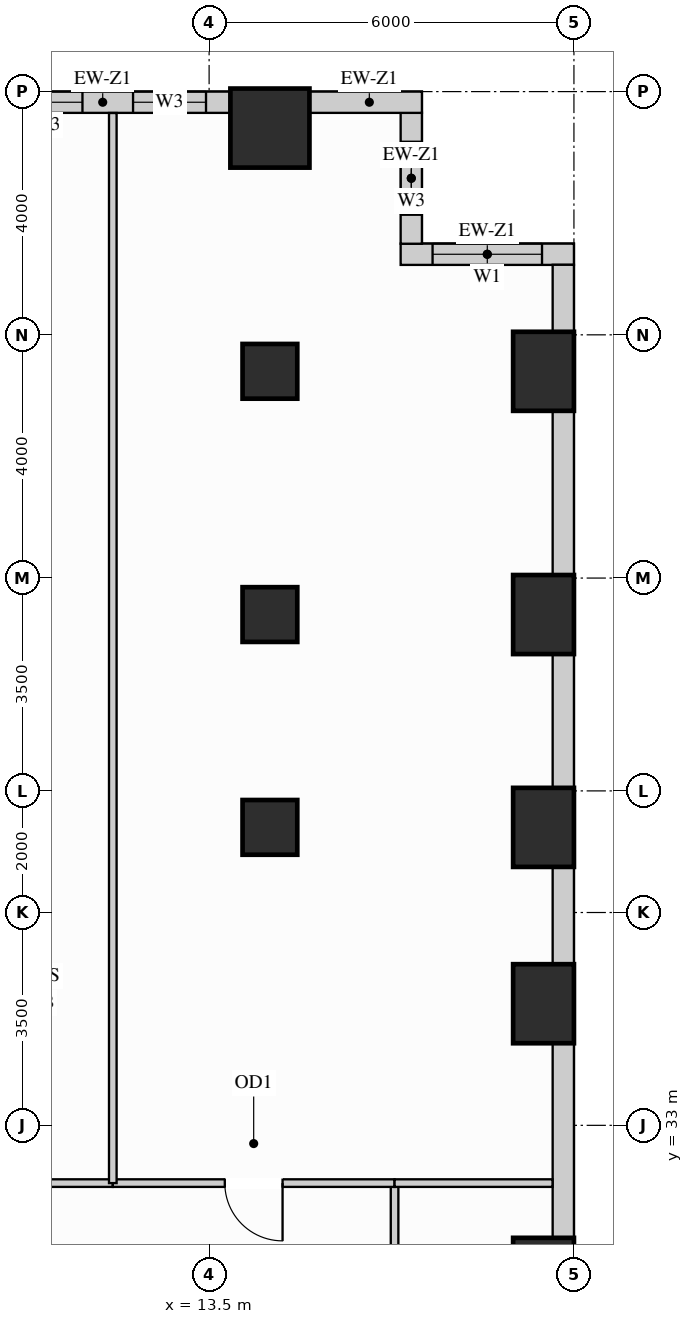
"""IFC4 building model, lengths in metres.
Left out: names, types, materials, properties, quantities, classifications, styles, units other than length and angle.
Written with IfcOpenShell. Run it as: python <this file> out.ifc"""

import sys

from ifc_helpers import new_model, si_unit, direction, frame, frame_2d, origin, origin_2d, place, context, subcontext, project, spatial, rectangle, extrude, source, transform, mapped, element, fill, save


model = new_model("IFC4")
c1 = context("Model", 3, precision=1e-05, world=origin(), true_north=direction((0.0, 1.0)))
c2 = subcontext(c1, "Body", "Model", "MODEL_VIEW")
j1 = project(units=[si_unit("LENGTHUNIT", "METRE"), si_unit("PLANEANGLEUNIT", "RADIAN")], contexts=[c1])
p1 = place(None, origin())
s1 = spatial("IfcSite", under=j1, at=p1, CompositionType="ELEMENT")
p2 = place(p1, origin())
s2 = spatial("IfcBuilding", under=s1, at=p2, CompositionType="ELEMENT")
p3 = place(p2, frame((0.0, 0.0, 58.5)))
s3 = spatial("IfcBuildingStorey", under=s2, at=p3, CompositionType="ELEMENT", Elevation=58.5)
m1 = source(origin(), c2, "Body", "SweptSolid", [
    extrude(rectangle(XDim=0.9, YDim=0.9, at=origin_2d()), origin(), (0.0, 0.0, 1.0), 3.38),
])
for number, where, z_axis, x_axis in (
    (1, (14.5, 37.9, 0.0), (0.0, 0.0, 1.0), (1.0, 0.0, 0.0)),
    (2, (14.5, 41.4, 0.0), (0.0, 0.0, 1.0), (1.0, 0.0, 0.0)),
    (3, (14.5, 45.4, 0.0), (0.0, 0.0, 1.0), (1.0, 0.0, 0.0)),
):
    element("IfcColumn", number, at=place(p3, frame(where, z_axis=z_axis, x_axis=x_axis)), inside=s3, PredefinedType="COLUMN", context=c2, shape_type="MappedRepresentation", body=[
        mapped(m1, transform((0.0, 0.0, 0.0), x_axis=(1.0, 0.0, 0.0), y_axis=(0.0, 1.0, 0.0), z_axis=(0.0, 0.0, 1.0))),
    ])
m2 = source(origin(), c2, "Body", "SweptSolid", [
    extrude(rectangle(XDim=1.0, YDim=1.3, at=origin_2d()), origin(), (0.0, 0.0, 1.0), 3.38),
])
for number, where, z_axis, x_axis in (
    (4, (19.0, 30.5, 0.0), (0.0, 0.0, 1.0), (1.0, 0.0, 0.0)),
    (5, (19.0, 35.0, 0.0), (0.0, 0.0, 1.0), (1.0, 0.0, 0.0)),
    (6, (19.0, 37.9, 0.0), (0.0, 0.0, 1.0), (1.0, 0.0, 0.0)),
    (7, (19.0, 41.4, 0.0), (0.0, 0.0, 1.0), (1.0, 0.0, 0.0)),
    (8, (19.0, 45.4, 0.0), (0.0, 0.0, 1.0), (1.0, 0.0, 0.0)),
):
    element("IfcColumn", number, at=place(p3, frame(where, z_axis=z_axis, x_axis=x_axis)), inside=s3, PredefinedType="COLUMN", context=c2, shape_type="MappedRepresentation", body=[
        mapped(m2, transform((0.0, 0.0, 0.0), x_axis=(1.0, 0.0, 0.0), y_axis=(0.0, 1.0, 0.0), z_axis=(0.0, 0.0, 1.0))),
    ])
m3 = source(origin(), c2, "Body", "SweptSolid", [
    extrude(rectangle(XDim=1.3, YDim=1.3, at=origin_2d()), origin(), (0.0, 0.0, 1.0), 3.38),
])
p4 = place(p3, frame((14.5, 49.4, 0.0), z_axis=(0.0, 0.0, 1.0), x_axis=(1.0, 0.0, 0.0)))
e9 = element("IfcColumn", 9, at=p4, inside=s3, PredefinedType="COLUMN", context=c2, shape_type="MappedRepresentation", body=[
    mapped(m3, transform((0.0, 0.0, 0.0), x_axis=(1.0, 0.0, 0.0), y_axis=(0.0, 1.0, 0.0), z_axis=(0.0, 0.0, 1.0))),
])
p5 = place(p3, frame((19.5, 47.325, 0.0), z_axis=(0.0, 0.0, 1.0), x_axis=(-1.0, 0.0, 0.0)))
e10 = element("IfcWall", 10, at=p5, inside=s3, PredefinedType="SOLIDWALL", context=c2, shape_type="SweptSolid", body=[
    extrude(rectangle(XDim=2.85, YDim=0.35, at=frame_2d((1.425, 0.0))), origin(), (0.0, 0.0, 1.0), 3.365),
])
p6 = place(p5, frame((0.525, 0.0, 0.78)))
e11 = element("IfcOpeningElement", 11, at=p6, cuts=e10, PredefinedType="OPENING", context=c2, shape_type="SweptSolid", body=[
    extrude(rectangle(XDim=1.8, YDim=2.1, at=frame_2d((0.9, 1.05))), frame((0.0, 0.185, 0.0), z_axis=(0.0, -1.0, 0.0), x_axis=(1.0, 0.0, 0.0)), (0.0, 0.0, 1.0), 0.37),
])
p7 = place(p3, frame((16.825, 47.498, 0.0), z_axis=(0.0, 0.0, 1.0), x_axis=(0.0, 1.0, 0.0)))
e12 = element("IfcWall", 12, at=p7, inside=s3, PredefinedType="SOLIDWALL", context=c2, shape_type="SweptSolid", body=[
    extrude(rectangle(XDim=2.154, YDim=0.35, at=frame_2d((1.077, 0.0))), origin(), (0.0, 0.0, 1.0), 3.365),
])
p8 = place(p7, frame((0.477, 0.0, 0.78)))
e13 = element("IfcOpeningElement", 13, at=p8, cuts=e12, PredefinedType="OPENING", context=c2, shape_type="SweptSolid", body=[
    extrude(rectangle(XDim=1.2, YDim=2.1, at=frame_2d((0.6, 1.05))), frame((0.0, 0.185, 0.0), z_axis=(0.0, -1.0, 0.0), x_axis=(1.0, 0.0, 0.0)), (0.0, 0.0, 1.0), 0.37),
])
m4 = source(origin(), c2, "Body", "SweptSolid", [
    extrude(rectangle(XDim=1.852, YDim=0.35, at=frame_2d((0.926, 0.0))), origin(), (0.0, 0.0, 1.0), 3.365),
])
p9 = place(p3, frame((17.0, 49.825, 0.0), z_axis=(0.0, 0.0, 1.0), x_axis=(-1.0, 0.0, 0.0)))
e14 = element("IfcWall", 14, at=p9, inside=s3, PredefinedType="SOLIDWALL", context=c2, shape_type="MappedRepresentation", body=[
    mapped(m4, transform((0.0, 0.0, 0.0), x_axis=(1.0, 0.0, 0.0), y_axis=(0.0, 1.0, 0.0), z_axis=(0.0, 0.0, 1.0))),
])
p10 = place(p3, frame((13.852, 49.825, 0.0), z_axis=(0.0, 0.0, 1.0), x_axis=(-1.0, 0.0, 0.0)))
e15 = element("IfcWall", 15, at=p10, inside=s3, PredefinedType="SOLIDWALL", context=c2, shape_type="SweptSolid", body=[
    extrude(rectangle(XDim=4.204, YDim=0.35, at=frame_2d((2.102, 0.0))), origin(), (0.0, 0.0, 1.0), 2.51),
])
p11 = place(p10, frame((0.403, 0.0, 0.78)))
e16 = element("IfcOpeningElement", 16, at=p11, cuts=e15, PredefinedType="OPENING", context=c2, shape_type="SweptSolid", body=[
    extrude(rectangle(XDim=1.2, YDim=1.55, at=frame_2d((0.6, 0.775))), frame((0.0, 0.185, 0.0), z_axis=(0.0, -1.0, 0.0), x_axis=(1.0, 0.0, 0.0)), (0.0, 0.0, 1.0), 0.37),
])
p12 = place(p10, frame((2.435, 0.0, 0.78)))
e17 = element("IfcOpeningElement", 17, at=p12, cuts=e15, PredefinedType="OPENING", context=c2, shape_type="SweptSolid", body=[
    extrude(rectangle(XDim=1.2, YDim=1.55, at=frame_2d((0.6, 0.775))), frame((0.0, 0.185, 0.0), z_axis=(0.0, -1.0, 0.0), x_axis=(1.0, 0.0, 0.0)), (0.0, 0.0, 1.0), 0.37),
])
m5 = source(origin(), c2, "Body", "SweptSolid", [
    extrude(rectangle(XDim=3.204, YDim=0.35, at=frame_2d((1.602, 0.0))), origin(), (0.0, 0.0, 1.0), 2.51),
])
p13 = place(p3, frame((19.325, 31.148, 0.0), z_axis=(0.0, 0.0, 1.0), x_axis=(0.0, 1.0, 0.0)))
e18 = element("IfcWall", 18, at=p13, inside=s3, PredefinedType="SOLIDWALL", context=c2, shape_type="MappedRepresentation", body=[
    mapped(m5, transform((0.0, 0.0, 0.0), x_axis=(1.0, 0.0, 0.0), y_axis=(0.0, 1.0, 0.0), z_axis=(0.0, 0.0, 1.0))),
])
m6 = source(origin(), c2, "Body", "SweptSolid", [
    extrude(rectangle(XDim=1.604, YDim=0.35, at=frame_2d((0.802, 0.0))), origin(), (0.0, 0.0, 1.0), 2.51),
])
p14 = place(p3, frame((19.325, 35.648, 0.0), z_axis=(0.0, 0.0, 1.0), x_axis=(0.0, 1.0, 0.0)))
e19 = element("IfcWall", 19, at=p14, inside=s3, PredefinedType="SOLIDWALL", context=c2, shape_type="MappedRepresentation", body=[
    mapped(m6, transform((0.0, 0.0, 0.0), x_axis=(1.0, 0.0, 0.0), y_axis=(0.0, 1.0, 0.0), z_axis=(0.0, 0.0, 1.0))),
])
m7 = source(origin(), c2, "Body", "SweptSolid", [
    extrude(rectangle(XDim=2.204, YDim=0.35, at=frame_2d((1.102, 0.0))), origin(), (0.0, 0.0, 1.0), 2.51),
])
p15 = place(p3, frame((19.325, 38.548, 0.0), z_axis=(0.0, 0.0, 1.0), x_axis=(0.0, 1.0, 0.0)))
e20 = element("IfcWall", 20, at=p15, inside=s3, PredefinedType="SOLIDWALL", context=c2, shape_type="MappedRepresentation", body=[
    mapped(m7, transform((0.0, 0.0, 0.0), x_axis=(1.0, 0.0, 0.0), y_axis=(0.0, 1.0, 0.0), z_axis=(0.0, 0.0, 1.0))),
])
m8 = source(origin(), c2, "Body", "SweptSolid", [
    extrude(rectangle(XDim=2.704, YDim=0.35, at=frame_2d((1.352, 0.0))), origin(), (0.0, 0.0, 1.0), 2.51),
])
p16 = place(p3, frame((19.325, 42.048, 0.0), z_axis=(0.0, 0.0, 1.0), x_axis=(0.0, 1.0, 0.0)))
e21 = element("IfcWall", 21, at=p16, inside=s3, PredefinedType="SOLIDWALL", context=c2, shape_type="MappedRepresentation", body=[
    mapped(m8, transform((0.0, 0.0, 0.0), x_axis=(1.0, 0.0, 0.0), y_axis=(0.0, 1.0, 0.0), z_axis=(0.0, 0.0, 1.0))),
])
m9 = source(origin(), c2, "Body", "SweptSolid", [
    extrude(rectangle(XDim=1.104, YDim=0.35, at=frame_2d((0.552, 0.0))), origin(), (0.0, 0.0, 1.0), 3.365),
])
p17 = place(p3, frame((19.325, 46.048, 0.0), z_axis=(0.0, 0.0, 1.0), x_axis=(0.0, 1.0, 0.0)))
e22 = element("IfcWall", 22, at=p17, inside=s3, PredefinedType="SOLIDWALL", context=c2, shape_type="MappedRepresentation", body=[
    mapped(m9, transform((0.0, 0.0, 0.0), x_axis=(1.0, 0.0, 0.0), y_axis=(0.0, 1.0, 0.0), z_axis=(0.0, 0.0, 1.0))),
])
p18 = place(p3, frame((16.55, 26.05, 0.0), z_axis=(0.0, 0.0, 1.0), x_axis=(0.0, 1.0, 0.0)))
e23 = element("IfcWall", 23, at=p18, inside=s3, PredefinedType="PARTITIONING", context=c2, shape_type="SweptSolid", body=[
    extrude(rectangle(XDim=6.0, YDim=0.125, at=frame_2d((3.0, 0.0))), origin(), (0.0, 0.0, 1.0), 3.365),
])
p19 = place(p18, frame((2.525, 0.0, 0.0)))
e24 = element("IfcOpeningElement", 24, at=p19, cuts=e23, PredefinedType="OPENING", context=c2, shape_type="SweptSolid", body=[
    extrude(rectangle(XDim=0.95, YDim=2.15, at=frame_2d((0.475, 1.075))), frame((0.0, 0.073, 0.0), z_axis=(0.0, -1.0, 0.0), x_axis=(1.0, 0.0, 0.0)), (0.0, 0.0, 1.0), 0.145),
])
p20 = place(p3, frame((7.121, 32.05, 0.0), z_axis=(0.0, 0.0, 1.0), x_axis=(1.0, 0.0, 0.0)))
e25 = element("IfcWall", 25, at=p20, inside=s3, PredefinedType="PARTITIONING", context=c2, shape_type="SweptSolid", body=[
    extrude(rectangle(XDim=4.795, YDim=0.125, at=frame_2d((2.397, 0.0))), origin(), (0.0, 0.0, 1.0), 3.365),
])
p21 = place(p20, frame((1.923, 0.0, 0.0)))
e26 = element("IfcOpeningElement", 26, at=p21, cuts=e25, PredefinedType="OPENING", context=c2, shape_type="SweptSolid", body=[
    extrude(rectangle(XDim=0.95, YDim=2.15, at=frame_2d((0.475, 1.075))), frame((0.0, 0.073, 0.0), z_axis=(0.0, -1.0, 0.0), x_axis=(1.0, 0.0, 0.0)), (0.0, 0.0, 1.0), 0.145),
])
p22 = place(p3, frame((11.916, 32.05, 0.0), z_axis=(0.0, 0.0, 1.0), x_axis=(1.0, 0.0, 0.0)))
e27 = element("IfcWall", 27, at=p22, inside=s3, PredefinedType="PARTITIONING", context=c2, shape_type="SweptSolid", body=[
    extrude(rectangle(XDim=4.634, YDim=0.125, at=frame_2d((2.317, 0.0))), origin(), (0.0, 0.0, 1.0), 3.365),
])
p23 = place(p22, frame((1.842, 0.0, 0.0)))
e28 = element("IfcOpeningElement", 28, at=p23, cuts=e27, PredefinedType="OPENING", context=c2, shape_type="SweptSolid", body=[
    extrude(rectangle(XDim=0.95, YDim=2.15, at=frame_2d((0.475, 1.075))), frame((0.0, 0.073, 0.0), z_axis=(0.0, -1.0, 0.0), x_axis=(1.0, 0.0, 0.0)), (0.0, 0.0, 1.0), 0.145),
])
m10 = source(origin(), c2, "Body", "SweptSolid", [
    extrude(rectangle(XDim=2.598, YDim=0.125, at=frame_2d((1.299, 0.0))), origin(), (0.0, 0.0, 1.0), 3.365),
])
p24 = place(p3, frame((16.55, 32.05, 0.0), z_axis=(0.0, 0.0, 1.0), x_axis=(1.0, 0.0, 0.0)))
e29 = element("IfcWall", 29, at=p24, inside=s3, PredefinedType="PARTITIONING", context=c2, shape_type="MappedRepresentation", body=[
    mapped(m10, transform((0.0, 0.0, 0.0), x_axis=(1.0, 0.0, 0.0), y_axis=(0.0, 1.0, 0.0), z_axis=(0.0, 0.0, 1.0))),
])
m11 = source(origin(), c2, "Body", "SweptSolid", [
    extrude(rectangle(XDim=17.598, YDim=0.125, at=frame_2d((8.799, 0.0))), origin(), (0.0, 0.0, 1.0), 3.365),
])
p25 = place(p3, frame((11.916, 32.05, 0.0), z_axis=(0.0, 0.0, 1.0), x_axis=(0.0, 1.0, 0.0)))
e30 = element("IfcWall", 30, at=p25, inside=s3, PredefinedType="PARTITIONING", context=c2, shape_type="MappedRepresentation", body=[
    mapped(m11, transform((0.0, 0.0, 0.0), x_axis=(1.0, 0.0, 0.0), y_axis=(0.0, 1.0, 0.0), z_axis=(0.0, 0.0, 1.0))),
])
m12 = source(origin(), c2, "Body", "SweptSolid", [
    extrude(rectangle(XDim=0.95, YDim=2.15, at=frame_2d((0.475, 1.075))), frame((0.0, 0.025, 0.0), z_axis=(0.0, -1.0, 0.0), x_axis=(1.0, 0.0, 0.0)), (0.0, 0.0, 1.0), 0.05),
])
p26 = place(p23, origin())
e31 = element("IfcDoor", 31, at=p26, inside=s3, OperationType="SINGLE_SWING_RIGHT", PredefinedType="DOOR", context=c2, shape_type="MappedRepresentation", body=[
    mapped(m12, transform((0.0, 0.0, 0.0), x_axis=(1.0, 0.0, 0.0), y_axis=(0.0, 1.0, 0.0), z_axis=(0.0, 0.0, 1.0))),
])
fill(e28, e31)
m13 = source(origin(), c2, "Body", "SweptSolid", [
    extrude(rectangle(XDim=1.8, YDim=2.1, at=frame_2d((0.9, 1.05))), frame((0.0, 0.03, 0.0), z_axis=(0.0, -1.0, 0.0), x_axis=(1.0, 0.0, 0.0)), (0.0, 0.0, 1.0), 0.06),
])
p27 = place(p6, origin())
e32 = element("IfcWindow", 32, at=p27, inside=s3, PartitioningType="SINGLE_PANEL", PredefinedType="WINDOW", context=c2, shape_type="MappedRepresentation", body=[
    mapped(m13, transform((0.0, 0.0, 0.0), x_axis=(1.0, 0.0, 0.0), y_axis=(0.0, 1.0, 0.0), z_axis=(0.0, 0.0, 1.0))),
])
fill(e11, e32)
m14 = source(origin(), c2, "Body", "SweptSolid", [
    extrude(rectangle(XDim=1.2, YDim=2.1, at=frame_2d((0.6, 1.05))), frame((0.0, 0.03, 0.0), z_axis=(0.0, -1.0, 0.0), x_axis=(1.0, 0.0, 0.0)), (0.0, 0.0, 1.0), 0.06),
])
p28 = place(p8, origin())
e33 = element("IfcWindow", 33, at=p28, inside=s3, PartitioningType="SINGLE_PANEL", PredefinedType="WINDOW", context=c2, shape_type="MappedRepresentation", body=[
    mapped(m14, transform((0.0, 0.0, 0.0), x_axis=(1.0, 0.0, 0.0), y_axis=(0.0, 1.0, 0.0), z_axis=(0.0, 0.0, 1.0))),
])
fill(e13, e33)
m15 = source(origin(), c2, "Body", "SweptSolid", [
    extrude(rectangle(XDim=1.2, YDim=1.55, at=frame_2d((0.6, 0.775))), frame((0.0, 0.03, 0.0), z_axis=(0.0, -1.0, 0.0), x_axis=(1.0, 0.0, 0.0)), (0.0, 0.0, 1.0), 0.06),
])
p29 = place(p11, origin())
e34 = element("IfcWindow", 34, at=p29, inside=s3, PartitioningType="SINGLE_PANEL", PredefinedType="WINDOW", context=c2, shape_type="MappedRepresentation", body=[
    mapped(m15, transform((0.0, 0.0, 0.0), x_axis=(1.0, 0.0, 0.0), y_axis=(0.0, 1.0, 0.0), z_axis=(0.0, 0.0, 1.0))),
])
fill(e16, e34)
p30 = place(p12, origin())
e35 = element("IfcWindow", 35, at=p30, inside=s3, PartitioningType="SINGLE_PANEL", PredefinedType="WINDOW", context=c2, shape_type="MappedRepresentation", body=[
    mapped(m15, transform((0.0, 0.0, 0.0), x_axis=(1.0, 0.0, 0.0), y_axis=(0.0, 1.0, 0.0), z_axis=(0.0, 0.0, 1.0))),
])
fill(e17, e35)
save(model, sys.argv[1])
